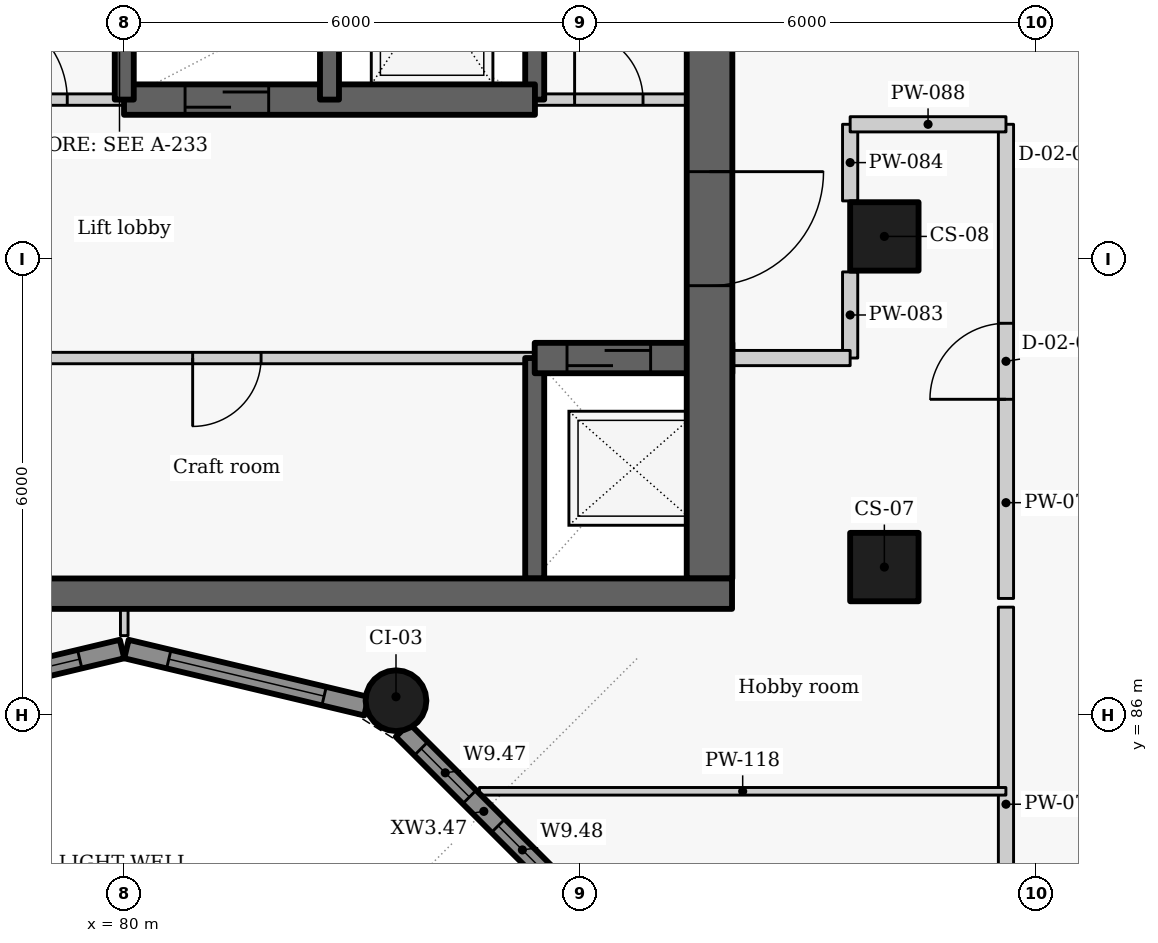
"""IFC4 building model, lengths in metres.
Left out: names, types, materials, properties, quantities, classifications, styles, units other than length and angle.
Written with IfcOpenShell. Run it as: python <this file> out.ifc"""

import sys

from ifc_helpers import new_model, si_unit, direction, frame, frame_2d, origin, origin_2d, place, context, subcontext, project, spatial, rectangle, circle, extrude, element, fill, save


model = new_model("IFC4")
c1 = context("Model", 3, precision=1e-05, world=origin(), true_north=direction((0.0, 1.0)))
c2 = subcontext(c1, "Body", "Model", "MODEL_VIEW")
j1 = project(units=[si_unit("LENGTHUNIT", "METRE"), si_unit("PLANEANGLEUNIT", "RADIAN")], contexts=[c1])
p1 = place(None, origin())
s1 = spatial("IfcSite", under=j1, at=p1, CompositionType="ELEMENT")
p2 = place(p1, origin())
s2 = spatial("IfcBuilding", under=s1, at=p2, CompositionType="ELEMENT")
p3 = place(p2, frame((0.0, 0.0, 183.3)))
s3 = spatial("IfcBuildingStorey", under=s2, at=p3, CompositionType="ELEMENT", Elevation=183.3)
for number, where, z_axis, x_axis in (
    (1, (90.0, 87.95, 0.0), (0.0, 0.0, 1.0), (0.0, 1.0, 0.0)),
    (2, (90.0, 92.3, 0.0), (0.0, 0.0, 1.0), (0.0, 1.0, 0.0)),
):
    element("IfcColumn", number, at=place(p3, frame(where, z_axis=z_axis, x_axis=x_axis)), inside=s3, PredefinedType="COLUMN", context=c2, shape_type="SweptSolid", body=[
        extrude(rectangle(XDim=0.9, YDim=0.9, at=origin_2d()), origin(), (0.0, 0.0, 1.0), 3.3),
    ])
p4 = place(p3, frame((83.575, 86.192, 0.0), z_axis=(0.0, 0.0, 1.0), x_axis=(-0.866025403784, 0.5, 0.0)))
e3 = element("IfcColumn", 3, at=p4, inside=s3, PredefinedType="COLUMN", context=c2, shape_type="SweptSolid", body=[
    extrude(circle(Radius=0.4, at=origin_2d()), origin(), (0.0, 0.0, 1.0), 3.3),
])
p5 = place(p3, frame((76.814, 86.119, 0.0), z_axis=(0.0, 0.0, 1.0), x_axis=(0.972773113459, 0.231759508395, 0.0)))
e4 = element("IfcWall", 4, at=p5, inside=s3, PredefinedType="SOLIDWALL", context=c2, shape_type="SweptSolid", body=[
    extrude(rectangle(XDim=3.246, YDim=0.25, at=frame_2d((1.623, 0.0))), origin(), (0.0, 0.0, 1.0), 2.425),
])
p6 = place(p5, frame((0.573, 0.0, 0.9)))
e5 = element("IfcOpeningElement", 5, at=p6, cuts=e4, PredefinedType="OPENING", context=c2, shape_type="SweptSolid", body=[
    extrude(rectangle(XDim=2.1, YDim=1.1, at=frame_2d((1.05, 0.55))), frame((0.0, 0.135, 0.0), z_axis=(0.0, -1.0, 0.0), x_axis=(1.0, 0.0, 0.0)), (0.0, 0.0, 1.0), 0.27),
])
p7 = place(p3, frame((80.029, 86.872, 0.0), z_axis=(0.0, 0.0, 1.0), x_axis=(0.972773113459, -0.231759508395, 0.0)))
e6 = element("IfcWall", 6, at=p7, inside=s3, PredefinedType="SOLIDWALL", context=c2, shape_type="SweptSolid", body=[
    extrude(rectangle(XDim=3.246, YDim=0.25, at=frame_2d((1.623, 0.0))), origin(), (0.0, 0.0, 1.0), 2.425),
])
p8 = place(p7, frame((0.573, 0.0, 0.9)))
e7 = element("IfcOpeningElement", 7, at=p8, cuts=e6, PredefinedType="OPENING", context=c2, shape_type="SweptSolid", body=[
    extrude(rectangle(XDim=2.1, YDim=1.1, at=frame_2d((1.05, 0.55))), frame((0.0, 0.135, 0.0), z_axis=(0.0, -1.0, 0.0), x_axis=(1.0, 0.0, 0.0)), (0.0, 0.0, 1.0), 0.27),
])
p9 = place(p3, frame((83.661, 85.806, 0.0), z_axis=(0.0, 0.0, 1.0), x_axis=(0.707106781187, -0.707106781187, 0.0)))
e8 = element("IfcWall", 8, at=p9, inside=s3, PredefinedType="SOLIDWALL", context=c2, shape_type="SweptSolid", body=[
    extrude(rectangle(XDim=3.033, YDim=0.25, at=frame_2d((1.517, 0.0))), origin(), (0.0, 0.0, 1.0), 2.425),
])
p10 = place(p9, frame((0.345, 0.0, 0.9)))
e9 = element("IfcOpeningElement", 9, at=p10, cuts=e8, PredefinedType="OPENING", context=c2, shape_type="SweptSolid", body=[
    extrude(rectangle(XDim=0.9, YDim=1.1, at=frame_2d((0.45, 0.55))), frame((0.0, 0.135, 0.0), z_axis=(0.0, -1.0, 0.0), x_axis=(1.0, 0.0, 0.0)), (0.0, 0.0, 1.0), 0.27),
])
p11 = place(p9, frame((1.78, 0.0, 0.9)))
e10 = element("IfcOpeningElement", 10, at=p11, cuts=e8, PredefinedType="OPENING", context=c2, shape_type="SweptSolid", body=[
    extrude(rectangle(XDim=0.9, YDim=1.1, at=frame_2d((0.45, 0.55))), frame((0.0, 0.135, 0.0), z_axis=(0.0, -1.0, 0.0), x_axis=(1.0, 0.0, 0.0)), (0.0, 0.0, 1.0), 0.27),
])
p12 = place(p3, frame((85.4, 90.7, 0.0), z_axis=(0.0, 0.0, 1.0), x_axis=(-1.0, 0.0, 0.0)))
e11 = element("IfcWall", 11, at=p12, inside=s3, PredefinedType="PARTITIONING", context=c2, shape_type="SweptSolid", body=[
    extrude(rectangle(XDim=13.4, YDim=0.15, at=frame_2d((6.7, 0.0))), origin(), (0.0, 0.0, 1.0), 3.025),
])
p13 = place(p12, frame((11.325, 0.0, 0.0)))
e12 = element("IfcOpeningElement", 12, at=p13, cuts=e11, PredefinedType="OPENING", context=c2, shape_type="SweptSolid", body=[
    extrude(rectangle(XDim=0.9, YDim=2.1, at=frame_2d((0.45, 1.05))), frame((0.0, 0.085, 0.0), z_axis=(0.0, -1.0, 0.0), x_axis=(1.0, 0.0, 0.0)), (0.0, 0.0, 1.0), 0.17),
])
p14 = place(p12, frame((9.0, 0.0, 0.0)))
e13 = element("IfcOpeningElement", 13, at=p14, cuts=e11, PredefinedType="OPENING", context=c2, shape_type="SweptSolid", body=[
    extrude(rectangle(XDim=0.9, YDim=2.1, at=frame_2d((0.45, 1.05))), frame((0.0, 0.085, 0.0), z_axis=(0.0, -1.0, 0.0), x_axis=(1.0, 0.0, 0.0)), (0.0, 0.0, 1.0), 0.17),
])
p15 = place(p12, frame((3.6, 0.0, 0.0)))
e14 = element("IfcOpeningElement", 14, at=p15, cuts=e11, PredefinedType="OPENING", context=c2, shape_type="SweptSolid", body=[
    extrude(rectangle(XDim=0.9, YDim=2.1, at=frame_2d((0.45, 1.05))), frame((0.0, 0.085, 0.0), z_axis=(0.0, -1.0, 0.0), x_axis=(1.0, 0.0, 0.0)), (0.0, 0.0, 1.0), 0.17),
])
p16 = place(p3, frame((85.4, 87.8, -0.275), z_axis=(0.0, 0.0, 1.0), x_axis=(0.0, 1.0, 0.0)))
e15 = element("IfcWall", 15, at=p16, inside=s3, PredefinedType="SHEAR", context=c2, shape_type="SweptSolid", body=[
    extrude(rectangle(XDim=2.9, YDim=0.25, at=frame_2d((1.45, 0.0))), origin(), (0.0, 0.0, 1.0), 3.3),
])
p17 = place(p3, frame((85.4, 94.1, -0.275), z_axis=(0.0, 0.0, 1.0), x_axis=(0.0, 1.0, 0.0)))
e16 = element("IfcWall", 16, at=p17, inside=s3, PredefinedType="SHEAR", context=c2, shape_type="SweptSolid", body=[
    extrude(rectangle(XDim=2.8, YDim=0.25, at=frame_2d((1.4, 0.0))), origin(), (0.0, 0.0, 1.0), 3.3),
])
p18 = place(p3, frame((85.4, 90.7, -0.275), z_axis=(0.0, 0.0, 1.0), x_axis=(1.0, 0.0, 0.0)))
e17 = element("IfcWall", 17, at=p18, inside=s3, PredefinedType="SHEAR", context=c2, shape_type="SweptSolid", body=[
    extrude(rectangle(XDim=2.6, YDim=0.4, at=frame_2d((1.3, 0.0))), origin(), (0.0, 0.0, 1.0), 3.3),
])
p19 = place(p18, frame((0.425, 0.0, 0.275)))
e18 = element("IfcOpeningElement", 18, at=p19, cuts=e17, PredefinedType="OPENING", context=c2, shape_type="SweptSolid", body=[
    extrude(rectangle(XDim=1.1, YDim=2.1, at=frame_2d((0.55, 1.05))), frame((0.0, 0.21, 0.0), z_axis=(0.0, -1.0, 0.0), x_axis=(1.0, 0.0, 0.0)), (0.0, 0.0, 1.0), 0.42),
])
p20 = place(p3, frame((87.7, 102.05, -0.275), z_axis=(0.0, 0.0, 1.0), x_axis=(0.0, -1.0, 0.0)))
e19 = element("IfcWall", 19, at=p20, inside=s3, PredefinedType="SHEAR", context=c2, shape_type="SweptSolid", body=[
    extrude(rectangle(XDim=14.25, YDim=0.6, at=frame_2d((7.125, 0.0))), origin(), (0.0, 0.0, 1.0), 3.3),
])
p21 = place(p20, frame((8.898, 0.0, 0.275)))
e20 = element("IfcOpeningElement", 20, at=p21, cuts=e19, PredefinedType="OPENING", context=c2, shape_type="SweptSolid", body=[
    extrude(rectangle(XDim=1.5, YDim=2.1, at=frame_2d((0.75, 1.05))), frame((0.0, 0.31, 0.0), z_axis=(0.0, -1.0, 0.0), x_axis=(1.0, 0.0, 0.0)), (0.0, 0.0, 1.0), 0.62),
])
p22 = place(p3, frame((77.297, 94.1, 0.0), z_axis=(0.0, 0.0, 1.0), x_axis=(1.0, 0.0, 0.0)))
e21 = element("IfcWall", 21, at=p22, inside=s3, PredefinedType="PARTITIONING", context=c2, shape_type="SweptSolid", body=[
    extrude(rectangle(XDim=2.706, YDim=0.15, at=frame_2d((1.353, 0.0))), origin(), (0.0, 0.0, 1.0), 3.025),
])
p23 = place(p22, frame((0.753, 0.0, 0.0)))
e22 = element("IfcOpeningElement", 22, at=p23, cuts=e21, PredefinedType="OPENING", context=c2, shape_type="SweptSolid", body=[
    extrude(rectangle(XDim=1.2, YDim=2.1, at=frame_2d((0.6, 1.05))), frame((0.0, 0.085, 0.0), z_axis=(0.0, -1.0, 0.0), x_axis=(1.0, 0.0, 0.0)), (0.0, 0.0, 1.0), 0.17),
])
p24 = place(p3, frame((85.397, 94.1, 0.0), z_axis=(0.0, 0.0, 1.0), x_axis=(1.0, 0.0, 0.0)))
e23 = element("IfcWall", 23, at=p24, inside=s3, PredefinedType="PARTITIONING", context=c2, shape_type="SweptSolid", body=[
    extrude(rectangle(XDim=2.603, YDim=0.15, at=frame_2d((1.302, 0.0))), origin(), (0.0, 0.0, 1.0), 3.025),
])
p25 = place(p24, frame((0.528, 0.0, 0.0)))
e24 = element("IfcOpeningElement", 24, at=p25, cuts=e23, PredefinedType="OPENING", context=c2, shape_type="SweptSolid", body=[
    extrude(rectangle(XDim=0.9, YDim=2.1, at=frame_2d((0.45, 1.05))), frame((0.0, 0.085, 0.0), z_axis=(0.0, -1.0, 0.0), x_axis=(1.0, 0.0, 0.0)), (0.0, 0.0, 1.0), 0.17),
])
p26 = place(p3, frame((79.997, 94.1, -0.275), z_axis=(0.0, 0.0, 1.0), x_axis=(1.0, 0.0, 0.0)))
e25 = element("IfcWall", 25, at=p26, inside=s3, PredefinedType="SHEAR", context=c2, shape_type="SweptSolid", body=[
    extrude(rectangle(XDim=5.406, YDim=0.4, at=frame_2d((2.703, 0.0))), origin(), (0.0, 0.0, 1.0), 3.3),
])
p27 = place(p26, frame((0.803, 0.0, 0.275)))
e26 = element("IfcOpeningElement", 26, at=p27, cuts=e25, PredefinedType="OPENING", context=c2, shape_type="SweptSolid", body=[
    extrude(rectangle(XDim=1.1, YDim=2.1, at=frame_2d((0.55, 1.05))), frame((0.0, 0.21, 0.0), z_axis=(0.0, -1.0, 0.0), x_axis=(1.0, 0.0, 0.0)), (0.0, 0.0, 1.0), 0.42),
])
for number, where, z_axis, x_axis in (
    (27, (80.0, 94.1, -0.275), (0.0, 0.0, 1.0), (0.0, 1.0, 0.0)),
    (28, (82.7, 94.1, -0.275), (0.0, 0.0, 1.0), (0.0, 1.0, 0.0)),
):
    element("IfcWall", number, at=place(p3, frame(where, z_axis=z_axis, x_axis=x_axis)), inside=s3, PredefinedType="SHEAR", context=c2, shape_type="SweptSolid", body=[
        extrude(rectangle(XDim=2.8, YDim=0.25, at=frame_2d((1.4, 0.0))), origin(), (0.0, 0.0, 1.0), 3.3),
    ])
p28 = place(p3, frame((91.6, 82.237, 0.0), z_axis=(0.0, 0.0, 1.0), x_axis=(0.0, 1.0, 0.0)))
e29 = element("IfcWall", 29, at=p28, inside=s3, PredefinedType="PARTITIONING", context=c2, shape_type="SweptSolid", body=[
    extrude(rectangle(XDim=5.186, YDim=0.2, at=frame_2d((2.593, 0.0))), origin(), (0.0, 0.0, 1.0), 3.025),
])
p29 = place(p3, frame((91.6, 87.537, 0.0), z_axis=(0.0, 0.0, 1.0), x_axis=(0.0, 1.0, 0.0)))
e30 = element("IfcWall", 30, at=p29, inside=s3, PredefinedType="PARTITIONING", context=c2, shape_type="SweptSolid", body=[
    extrude(rectangle(XDim=6.238, YDim=0.2, at=frame_2d((3.119, 0.0))), origin(), (0.0, 0.0, 1.0), 3.025),
])
p30 = place(p29, frame((2.62, 0.0, 0.0)))
e31 = element("IfcOpeningElement", 31, at=p30, cuts=e30, PredefinedType="OPENING", context=c2, shape_type="SweptSolid", body=[
    extrude(rectangle(XDim=1.0, YDim=2.1, at=frame_2d((0.5, 1.05))), frame((0.0, 0.11, 0.0), z_axis=(0.0, -1.0, 0.0), x_axis=(1.0, 0.0, 0.0)), (0.0, 0.0, 1.0), 0.22),
])
p31 = place(p3, frame((89.55, 90.7, 0.0), z_axis=(0.0, 0.0, 1.0), x_axis=(0.0, 1.0, 0.0)))
e32 = element("IfcWall", 32, at=p31, inside=s3, PredefinedType="PARTITIONING", context=c2, shape_type="SweptSolid", body=[
    extrude(rectangle(XDim=1.133, YDim=0.2, at=frame_2d((0.566, 0.0))), origin(), (0.0, 0.0, 1.0), 3.025),
])
p32 = place(p3, frame((89.55, 92.767, 0.0), z_axis=(0.0, 0.0, 1.0), x_axis=(0.0, 1.0, 0.0)))
e33 = element("IfcWall", 33, at=p32, inside=s3, PredefinedType="PARTITIONING", context=c2, shape_type="SweptSolid", body=[
    extrude(rectangle(XDim=1.008, YDim=0.2, at=frame_2d((0.504, 0.0))), origin(), (0.0, 0.0, 1.0), 3.025),
])
p33 = place(p3, frame((89.55, 93.775, 0.0), z_axis=(0.0, 0.0, 1.0), x_axis=(1.0, 0.0, 0.0)))
e34 = element("IfcWall", 34, at=p33, inside=s3, PredefinedType="PARTITIONING", context=c2, shape_type="SweptSolid", body=[
    extrude(rectangle(XDim=2.05, YDim=0.2, at=frame_2d((1.025, 0.0))), origin(), (0.0, 0.0, 1.0), 2.505),
])
p34 = place(p3, frame((88.0, 90.7, 0.0), z_axis=(0.0, 0.0, 1.0), x_axis=(1.0, 0.0, 0.0)))
e35 = element("IfcWall", 35, at=p34, inside=s3, PredefinedType="PARTITIONING", context=c2, shape_type="SweptSolid", body=[
    extrude(rectangle(XDim=1.55, YDim=0.2, at=frame_2d((0.775, 0.0))), origin(), (0.0, 0.0, 1.0), 3.025),
])
p35 = place(p3, frame((80.0, 87.048, 0.0), z_axis=(0.0, 0.0, 1.0), x_axis=(0.0, 1.0, 0.0)))
e36 = element("IfcWall", 36, at=p35, inside=s3, PredefinedType="PARTITIONING", context=c2, shape_type="SweptSolid", body=[
    extrude(rectangle(XDim=0.352, YDim=0.1, at=frame_2d((0.176, 0.0))), origin(), (0.0, 0.0, 1.0), 3.025),
])
p36 = place(p3, frame((84.673, 85.0, 0.0), z_axis=(0.0, 0.0, 1.0), x_axis=(1.0, 0.0, 0.0)))
e37 = element("IfcWall", 37, at=p36, inside=s3, PredefinedType="PARTITIONING", context=c2, shape_type="SweptSolid", body=[
    extrude(rectangle(XDim=6.926, YDim=0.1, at=frame_2d((3.463, 0.0))), origin(), (0.0, 0.0, 1.0), 2.505),
])
p37 = place(p3, frame((72.004, 87.6, -0.275), z_axis=(0.0, 0.0, 1.0), x_axis=(1.0, 0.0, 0.0)))
e38 = element("IfcWall", 38, at=p37, inside=s3, PredefinedType="SHEAR", context=c2, shape_type="SweptSolid", body=[
    extrude(rectangle(XDim=15.992, YDim=0.4, at=frame_2d((7.996, 0.0))), origin(), (0.0, 0.0, 1.0), 3.3),
])
p38 = place(p6, origin())
e39 = element("IfcWindow", 39, at=p38, inside=s3, PartitioningType="SINGLE_PANEL", PredefinedType="WINDOW", context=c2, shape_type="SweptSolid", body=[
    extrude(rectangle(XDim=2.1, YDim=1.1, at=frame_2d((1.05, 0.55))), frame((0.0, 0.03, 0.0), z_axis=(0.0, -1.0, 0.0), x_axis=(1.0, 0.0, 0.0)), (0.0, 0.0, 1.0), 0.06),
])
fill(e5, e39)
p39 = place(p8, origin())
e40 = element("IfcWindow", 40, at=p39, inside=s3, PartitioningType="SINGLE_PANEL", PredefinedType="WINDOW", context=c2, shape_type="SweptSolid", body=[
    extrude(rectangle(XDim=2.1, YDim=1.1, at=frame_2d((1.05, 0.55))), frame((0.0, 0.03, 0.0), z_axis=(0.0, -1.0, 0.0), x_axis=(1.0, 0.0, 0.0)), (0.0, 0.0, 1.0), 0.06),
])
fill(e7, e40)
p40 = place(p10, origin())
e41 = element("IfcWindow", 41, at=p40, inside=s3, PartitioningType="SINGLE_PANEL", PredefinedType="WINDOW", context=c2, shape_type="SweptSolid", body=[
    extrude(rectangle(XDim=0.9, YDim=1.1, at=frame_2d((0.45, 0.55))), frame((0.0, 0.03, 0.0), z_axis=(0.0, -1.0, 0.0), x_axis=(1.0, 0.0, 0.0)), (0.0, 0.0, 1.0), 0.06),
])
fill(e9, e41)
p41 = place(p11, origin())
e42 = element("IfcWindow", 42, at=p41, inside=s3, PartitioningType="SINGLE_PANEL", PredefinedType="WINDOW", context=c2, shape_type="SweptSolid", body=[
    extrude(rectangle(XDim=0.9, YDim=1.1, at=frame_2d((0.45, 0.55))), frame((0.0, 0.03, 0.0), z_axis=(0.0, -1.0, 0.0), x_axis=(1.0, 0.0, 0.0)), (0.0, 0.0, 1.0), 0.06),
])
fill(e10, e42)
p42 = place(p19, origin())
e43 = element("IfcDoor", 43, at=p42, inside=s3, OperationType="SLIDING_TO_LEFT", PredefinedType="DOOR", context=c2, shape_type="SweptSolid", body=[
    extrude(rectangle(XDim=1.1, YDim=2.1, at=frame_2d((0.55, 1.05))), frame((0.0, 0.025, 0.0), z_axis=(0.0, -1.0, 0.0), x_axis=(1.0, 0.0, 0.0)), (0.0, 0.0, 1.0), 0.05),
])
fill(e18, e43)
p43 = place(p15, origin())
e44 = element("IfcDoor", 44, at=p43, inside=s3, OperationType="SINGLE_SWING_RIGHT", PredefinedType="DOOR", context=c2, shape_type="SweptSolid", body=[
    extrude(rectangle(XDim=0.9, YDim=2.1, at=frame_2d((0.45, 1.05))), frame((0.0, 0.025, 0.0), z_axis=(0.0, -1.0, 0.0), x_axis=(1.0, 0.0, 0.0)), (0.0, 0.0, 1.0), 0.05),
])
fill(e14, e44)
p44 = place(p23, origin())
e45 = element("IfcDoor", 45, at=p44, inside=s3, OperationType="DOUBLE_DOOR_SINGLE_SWING", PredefinedType="DOOR", context=c2, shape_type="SweptSolid", body=[
    extrude(rectangle(XDim=1.2, YDim=2.1, at=frame_2d((0.6, 1.05))), frame((0.0, 0.025, 0.0), z_axis=(0.0, -1.0, 0.0), x_axis=(1.0, 0.0, 0.0)), (0.0, 0.0, 1.0), 0.05),
])
fill(e22, e45)
p45 = place(p27, origin())
e46 = element("IfcDoor", 46, at=p45, inside=s3, OperationType="SLIDING_TO_LEFT", PredefinedType="DOOR", context=c2, shape_type="SweptSolid", body=[
    extrude(rectangle(XDim=1.1, YDim=2.1, at=frame_2d((0.55, 1.05))), frame((0.0, 0.025, 0.0), z_axis=(0.0, -1.0, 0.0), x_axis=(1.0, 0.0, 0.0)), (0.0, 0.0, 1.0), 0.05),
])
fill(e26, e46)
p46 = place(p25, origin())
e47 = element("IfcDoor", 47, at=p46, inside=s3, OperationType="SINGLE_SWING_LEFT", PredefinedType="DOOR", context=c2, shape_type="SweptSolid", body=[
    extrude(rectangle(XDim=0.9, YDim=2.1, at=frame_2d((0.45, 1.05))), frame((0.0, 0.025, 0.0), z_axis=(0.0, -1.0, 0.0), x_axis=(1.0, 0.0, 0.0)), (0.0, 0.0, 1.0), 0.05),
])
fill(e24, e47)
p47 = place(p30, origin())
e48 = element("IfcDoor", 48, at=p47, inside=s3, OperationType="SINGLE_SWING_LEFT", PredefinedType="DOOR", context=c2, shape_type="SweptSolid", body=[
    extrude(rectangle(XDim=1.0, YDim=2.1, at=frame_2d((0.5, 1.05))), frame((0.0, 0.025, 0.0), z_axis=(0.0, -1.0, 0.0), x_axis=(1.0, 0.0, 0.0)), (0.0, 0.0, 1.0), 0.05),
])
fill(e31, e48)
p48 = place(p21, origin())
e49 = element("IfcDoor", 49, at=p48, inside=s3, OperationType="DOUBLE_DOOR_SINGLE_SWING", PredefinedType="DOOR", context=c2, shape_type="SweptSolid", body=[
    extrude(rectangle(XDim=1.5, YDim=2.1, at=frame_2d((0.75, 1.05))), frame((0.0, 0.025, 0.0), z_axis=(0.0, -1.0, 0.0), x_axis=(1.0, 0.0, 0.0)), (0.0, 0.0, 1.0), 0.05),
])
fill(e20, e49)
save(model, sys.argv[1])
